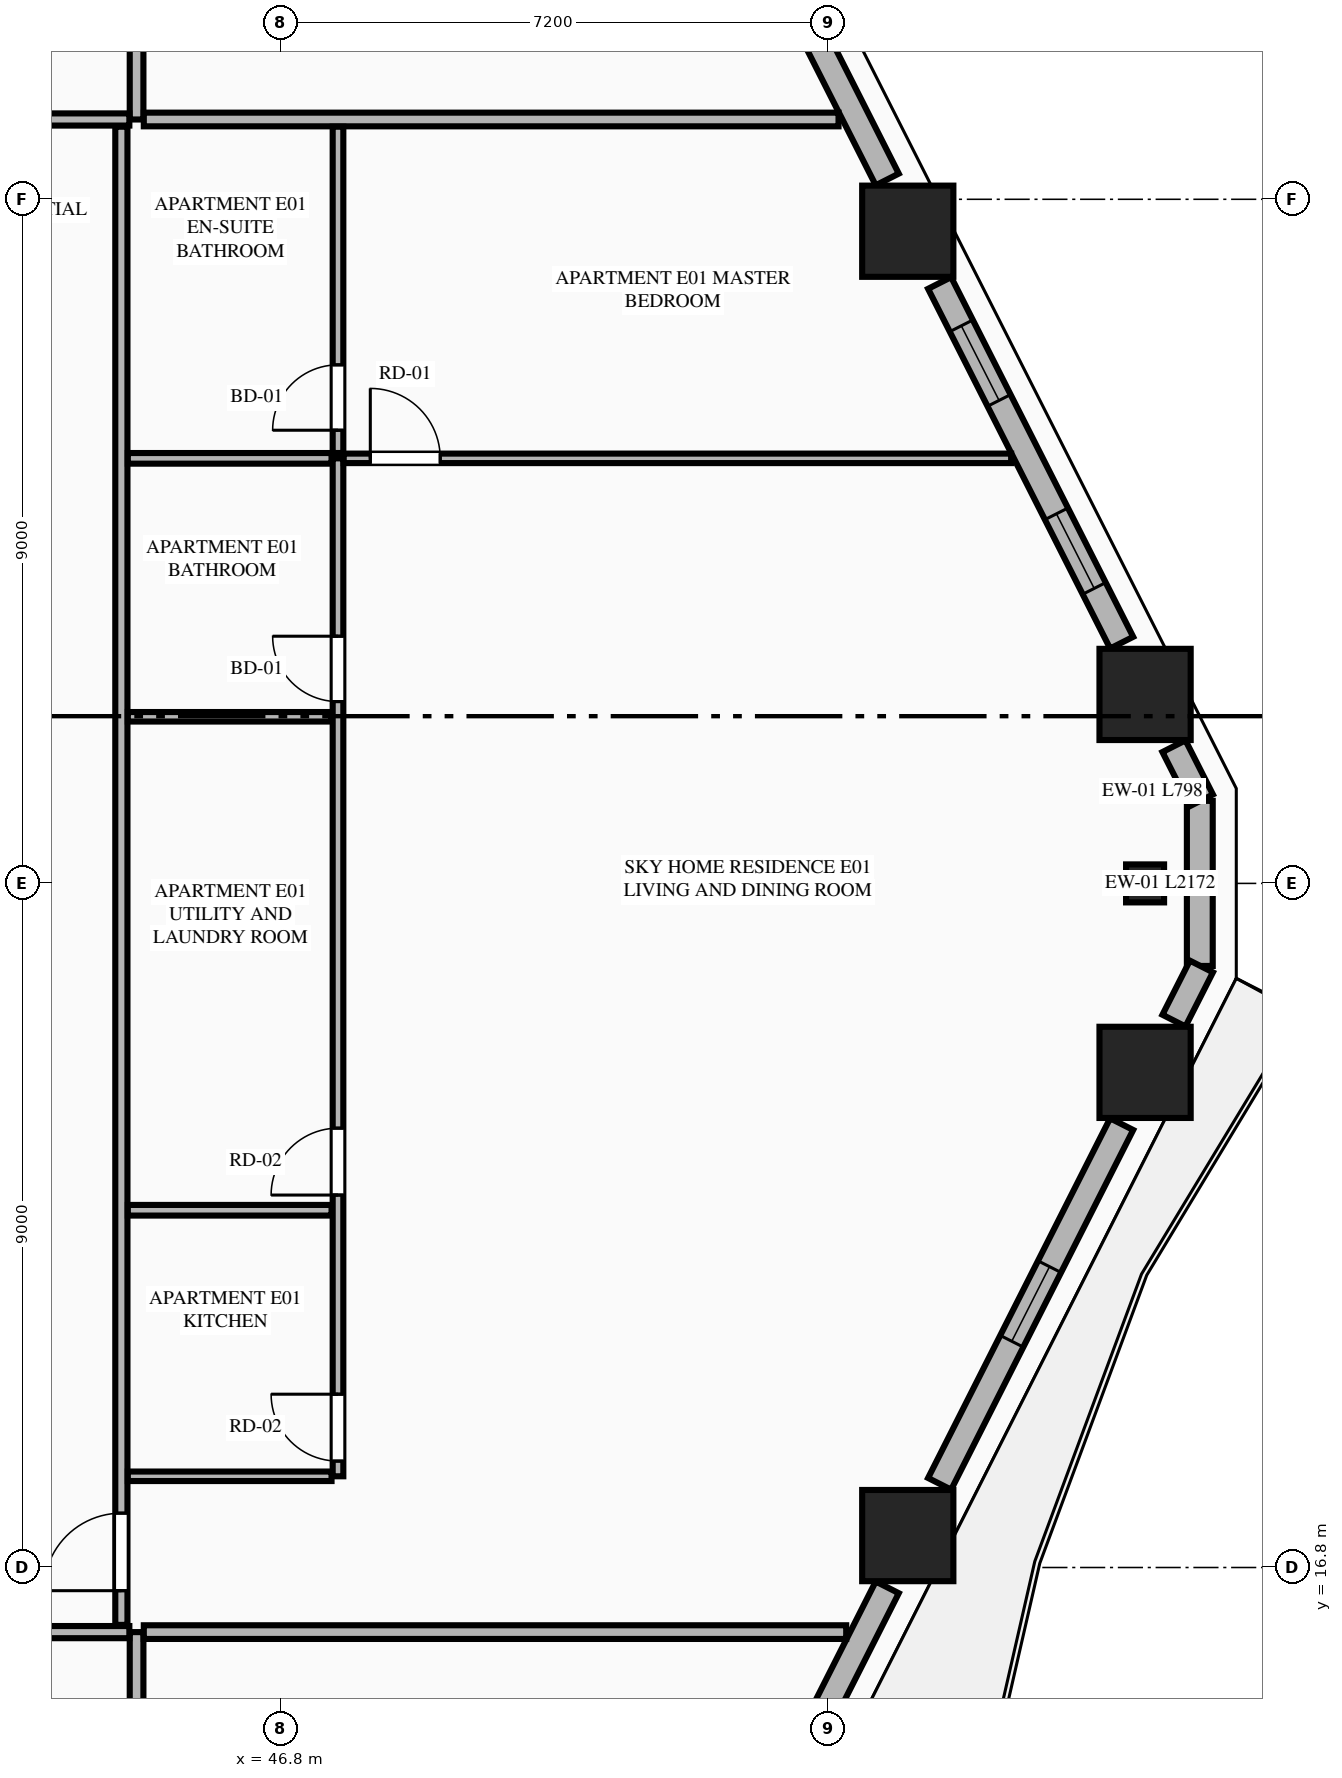
"""IFC4 building model, lengths in metres.
Left out: names, types, materials, properties, quantities, classifications, styles, units other than length and angle.
Written with IfcOpenShell. Run it as: python <this file> out.ifc"""

import sys

from ifc_helpers import new_model, si_unit, direction, frame, frame_2d, origin, origin_2d, place, context, subcontext, project, spatial, rectangle, extrude, element, fill, save


model = new_model("IFC4")
c1 = context("Model", 3, precision=1e-05, world=origin(), true_north=direction((0.0, 1.0)))
c2 = subcontext(c1, "Body", "Model", "MODEL_VIEW")
j1 = project(units=[si_unit("LENGTHUNIT", "METRE"), si_unit("PLANEANGLEUNIT", "RADIAN")], contexts=[c1])
p1 = place(None, origin())
s1 = spatial("IfcSite", under=j1, at=p1, CompositionType="ELEMENT")
p2 = place(p1, origin())
s2 = spatial("IfcBuilding", under=s1, at=p2, CompositionType="ELEMENT")
p3 = place(p2, frame((0.0, 0.0, 49.75)))
s3 = spatial("IfcBuildingStorey", under=s2, at=p3, CompositionType="ELEMENT", Elevation=49.75)
for number, where, z_axis, x_axis in (
    (1, (55.046, 17.22, 0.0), (0.0, 0.0, 1.0), (1.0, 0.0, 0.0)),
    (2, (58.168, 23.314, 0.0), (0.0, 0.0, 1.0), (1.0, 0.0, 0.0)),
    (3, (58.168, 28.286, 0.0), (0.0, 0.0, 1.0), (1.0, 0.0, 0.0)),
    (4, (55.046, 34.38, 0.0), (0.0, 0.0, 1.0), (1.0, 0.0, 0.0)),
):
    element("IfcColumn", number, at=place(p3, frame(where, z_axis=z_axis, x_axis=x_axis)), inside=s3, PredefinedType="COLUMN", context=c2, shape_type="SweptSolid", body=[
        extrude(rectangle(XDim=1.2, YDim=1.2, at=origin_2d()), origin(), (0.0, 0.0, 1.0), 3.55),
    ])
p4 = place(p3, frame((58.168, 25.8, 0.0), z_axis=(0.0, 0.0, 1.0), x_axis=(0.0, 1.0, 0.0)))
e5 = element("IfcColumn", 5, at=p4, inside=s3, PredefinedType="PILASTER", context=c2, shape_type="SweptSolid", body=[
    extrude(rectangle(XDim=0.5, YDim=0.35, at=origin_2d()), origin(), (0.0, 0.0, 1.0), 3.55),
])
p5 = place(p3, frame((58.888, 24.714, 0.0), z_axis=(0.0, 0.0, 1.0), x_axis=(0.0, 1.0, 0.0)))
e6 = element("IfcWall", 6, at=p5, inside=s3, PredefinedType="STANDARD", context=c2, shape_type="SweptSolid", body=[
    extrude(rectangle(XDim=2.172, YDim=0.34, at=frame_2d((1.086, 0.0))), origin(), (0.0, 0.0, 1.0), 3.33),
])
p6 = place(p3, frame((52.271, 11.59, 0.0), z_axis=(0.0, 0.0, 1.0), x_axis=(0.451592100298, 0.892224509273, 0.0)))
e7 = element("IfcWall", 7, at=p6, inside=s3, PredefinedType="STANDARD", context=c2, shape_type="SweptSolid", body=[
    extrude(rectangle(XDim=5.547, YDim=0.34, at=frame_2d((2.773, 0.0))), origin(), (0.0, 0.0, 1.0), 2.787),
])
p7 = place(p6, frame((1.768, 0.0, 0.0)))
e8 = element("IfcOpeningElement", 8, at=p7, cuts=e7, PredefinedType="OPENING", context=c2, shape_type="SweptSolid", body=[
    extrude(rectangle(XDim=1.1, YDim=2.25, at=frame_2d((0.55, 1.125))), frame((0.0, 0.18, 0.0), z_axis=(0.0, -1.0, 0.0), x_axis=(1.0, 0.0, 0.0)), (0.0, 0.0, 1.0), 0.36),
])
p8 = place(p3, frame((55.465, 17.901, 0.0), z_axis=(0.0, 0.0, 1.0), x_axis=(0.451572088722, 0.892234637686, 0.0)))
e9 = element("IfcWall", 9, at=p8, inside=s3, PredefinedType="STANDARD", context=c2, shape_type="SweptSolid", body=[
    extrude(rectangle(XDim=5.304, YDim=0.34, at=frame_2d((2.652, 0.0))), origin(), (0.0, 0.0, 1.0), 2.787),
])
p9 = place(p8, frame((2.102, 0.0, 0.75)))
e10 = element("IfcOpeningElement", 10, at=p9, cuts=e9, PredefinedType="OPENING", context=c2, shape_type="SweptSolid", body=[
    extrude(rectangle(XDim=1.1, YDim=1.887, at=frame_2d((0.55, 0.943))), frame((0.0, 0.18, 0.0), z_axis=(0.0, -1.0, 0.0), x_axis=(1.0, 0.0, 0.0)), (0.0, 0.0, 1.0), 0.36),
])
for number, where, z_axis, x_axis in (
    (11, (58.548, 23.995, 0.0), (0.0, 0.0, 1.0), (0.452, 0.892, 0.0)),
    (12, (58.909, 26.893, 0.0), (0.0, 0.0, 1.0), (-0.452, 0.892, 0.0)),
):
    element("IfcWall", number, at=place(p3, frame(where, z_axis=z_axis, x_axis=x_axis)), inside=s3, PredefinedType="STANDARD", context=c2, shape_type="SweptSolid", body=[
        extrude(rectangle(XDim=0.798, YDim=0.34, at=frame_2d((0.399, 0.0))), origin(), (0.0, 0.0, 1.0), 3.33),
    ])
p10 = place(p3, frame((57.86, 28.967, 0.0), z_axis=(0.0, 0.0, 1.0), x_axis=(-0.451590635984, 0.892225250422, 0.0)))
e13 = element("IfcWall", 13, at=p10, inside=s3, PredefinedType="STANDARD", context=c2, shape_type="SweptSolid", body=[
    extrude(rectangle(XDim=5.303, YDim=0.34, at=frame_2d((2.652, 0.0))), origin(), (0.0, 0.0, 1.0), 2.787),
])
p11 = place(p10, frame((0.8, 0.0, 0.75)))
e14 = element("IfcOpeningElement", 14, at=p11, cuts=e13, PredefinedType="OPENING", context=c2, shape_type="SweptSolid", body=[
    extrude(rectangle(XDim=1.1, YDim=1.887, at=frame_2d((0.55, 0.943))), frame((0.0, 0.18, 0.0), z_axis=(0.0, -1.0, 0.0), x_axis=(1.0, 0.0, 0.0)), (0.0, 0.0, 1.0), 0.36),
])
p12 = place(p10, frame((3.572, 0.0, 0.75)))
e15 = element("IfcOpeningElement", 15, at=p12, cuts=e13, PredefinedType="OPENING", context=c2, shape_type="SweptSolid", body=[
    extrude(rectangle(XDim=1.1, YDim=1.887, at=frame_2d((0.55, 0.943))), frame((0.0, 0.18, 0.0), z_axis=(0.0, -1.0, 0.0), x_axis=(1.0, 0.0, 0.0)), (0.0, 0.0, 1.0), 0.36),
])
p13 = place(p3, frame((54.776, 35.061, 0.0), z_axis=(0.0, 0.0, 1.0), x_axis=(-0.451592100298, 0.892224509273, 0.0)))
e16 = element("IfcWall", 16, at=p13, inside=s3, PredefinedType="STANDARD", context=c2, shape_type="SweptSolid", body=[
    extrude(rectangle(XDim=5.547, YDim=0.34, at=frame_2d((2.773, 0.0))), origin(), (0.0, 0.0, 1.0), 2.787),
])
p14 = place(p13, frame((2.223, 0.0, 0.75)))
e17 = element("IfcOpeningElement", 17, at=p14, cuts=e16, PredefinedType="OPENING", context=c2, shape_type="SweptSolid", body=[
    extrude(rectangle(XDim=1.1, YDim=1.887, at=frame_2d((0.55, 0.943))), frame((0.0, 0.18, 0.0), z_axis=(0.0, -1.0, 0.0), x_axis=(1.0, 0.0, 0.0)), (0.0, 0.0, 1.0), 0.36),
])
p15 = place(p3, frame((44.9, 2.455, 0.0), z_axis=(0.0, 0.0, 1.0), x_axis=(0.0, 1.0, 0.0)))
e18 = element("IfcWall", 18, at=p15, inside=s3, PredefinedType="PARTITIONING", context=c2, shape_type="SweptSolid", body=[
    extrude(rectangle(XDim=13.495, YDim=0.18, at=frame_2d((6.748, 0.0))), origin(), (0.0, 0.0, 1.0), 3.33),
])
p16 = place(p3, frame((19.995, 15.95, 0.0), z_axis=(0.0, 0.0, 1.0), x_axis=(1.0, 0.0, 0.0)))
e19 = element("IfcWall", 19, at=p16, inside=s3, PredefinedType="PARTITIONING", context=c2, shape_type="SweptSolid", body=[
    extrude(rectangle(XDim=24.81, YDim=0.16, at=frame_2d((12.405, 0.0))), origin(), (0.0, 0.0, 1.0), 3.33),
])
p17 = place(p16, frame((22.605, 0.0, 0.0)))
e20 = element("IfcOpeningElement", 20, at=p17, cuts=e19, PredefinedType="OPENING", context=c2, shape_type="SweptSolid", body=[
    extrude(rectangle(XDim=1.02, YDim=2.25, at=frame_2d((0.51, 1.125))), frame((0.0, 0.09, 0.0), z_axis=(0.0, -1.0, 0.0), x_axis=(1.0, 0.0, 0.0)), (0.0, 0.0, 1.0), 0.18),
])
p18 = place(p3, frame((44.9, 35.85, 0.0), z_axis=(0.0, 0.0, 1.0), x_axis=(0.0, 1.0, 0.0)))
e21 = element("IfcWall", 21, at=p18, inside=s3, PredefinedType="PARTITIONING", context=c2, shape_type="SweptSolid", body=[
    extrude(rectangle(XDim=13.295, YDim=0.18, at=frame_2d((6.647, 0.0))), origin(), (0.0, 0.0, 1.0), 3.33),
])
p19 = place(p3, frame((28.373, 35.85, 0.0), z_axis=(0.0, 0.0, 1.0), x_axis=(1.0, 0.0, 0.0)))
e22 = element("IfcWall", 22, at=p19, inside=s3, PredefinedType="PARTITIONING", context=c2, shape_type="SweptSolid", body=[
    extrude(rectangle(XDim=16.432, YDim=0.16, at=frame_2d((8.216, 0.0))), origin(), (0.0, 0.0, 1.0), 3.33),
])
p20 = place(p19, frame((0.355, 0.0, 0.0)))
e23 = element("IfcOpeningElement", 23, at=p20, cuts=e22, PredefinedType="OPENING", context=c2, shape_type="SweptSolid", body=[
    extrude(rectangle(XDim=1.35, YDim=2.35, at=frame_2d((0.675, 1.175))), frame((0.0, 0.09, 0.0), z_axis=(0.0, -1.0, 0.0), x_axis=(1.0, 0.0, 0.0)), (0.0, 0.0, 1.0), 0.18),
])
p21 = place(p3, frame((44.995, 15.95, 0.0), z_axis=(0.0, 0.0, 1.0), x_axis=(1.0, 0.0, 0.0)))
e24 = element("IfcWall", 24, at=p21, inside=s3, PredefinedType="PARTITIONING", context=c2, shape_type="SweptSolid", body=[
    extrude(rectangle(XDim=9.241, YDim=0.18, at=frame_2d((4.621, 0.0))), origin(), (0.0, 0.0, 1.0), 3.33),
])
p22 = place(p3, frame((44.995, 35.85, 0.0), z_axis=(0.0, 0.0, 1.0), x_axis=(1.0, 0.0, 0.0)))
e25 = element("IfcWall", 25, at=p22, inside=s3, PredefinedType="PARTITIONING", context=c2, shape_type="SweptSolid", body=[
    extrude(rectangle(XDim=9.14, YDim=0.18, at=frame_2d((4.57, 0.0))), origin(), (0.0, 0.0, 1.0), 3.33),
])
p23 = place(p3, frame((44.7, 16.045, 0.0), z_axis=(0.0, 0.0, 1.0), x_axis=(0.0, 1.0, 0.0)))
e26 = element("IfcWall", 26, at=p23, inside=s3, PredefinedType="PARTITIONING", context=c2, shape_type="SweptSolid", body=[
    extrude(rectangle(XDim=19.71, YDim=0.16, at=frame_2d((9.855, 0.0))), origin(), (0.0, 0.0, 1.0), 2.7),
])
p24 = place(p23, frame((0.45, 0.0, 0.0)))
e27 = element("IfcOpeningElement", 27, at=p24, cuts=e26, PredefinedType="OPENING", context=c2, shape_type="SweptSolid", body=[
    extrude(rectangle(XDim=1.02, YDim=2.25, at=frame_2d((0.51, 1.125))), frame((0.0, 0.09, 0.0), z_axis=(0.0, -1.0, 0.0), x_axis=(1.0, 0.0, 0.0)), (0.0, 0.0, 1.0), 0.18),
])
p25 = place(p3, frame((44.785, 18.0, 0.0), z_axis=(0.0, 0.0, 1.0), x_axis=(1.0, 0.0, 0.0)))
e28 = element("IfcWall", 28, at=p25, inside=s3, PredefinedType="PARTITIONING", context=c2, shape_type="SweptSolid", body=[
    extrude(rectangle(XDim=2.68, YDim=0.125, at=frame_2d((1.34, 0.0))), origin(), (0.0, 0.0, 1.0), 2.7),
])
p26 = place(p3, frame((47.55, 18.0, 0.0), z_axis=(0.0, 0.0, 1.0), x_axis=(0.0, 1.0, 0.0)))
e29 = element("IfcWall", 29, at=p26, inside=s3, PredefinedType="PLUMBINGWALL", context=c2, shape_type="SweptSolid", body=[
    extrude(rectangle(XDim=13.392, YDim=0.14, at=frame_2d((6.696, 0.0))), origin(), (0.0, 0.0, 1.0), 3.33),
])
p27 = place(p26, frame((0.2, 0.0, 0.0)))
e30 = element("IfcOpeningElement", 30, at=p27, cuts=e29, PredefinedType="OPENING", context=c2, shape_type="SweptSolid", body=[
    extrude(rectangle(XDim=0.88, YDim=2.15, at=frame_2d((0.44, 1.075))), frame((0.0, 0.08, 0.0), z_axis=(0.0, -1.0, 0.0), x_axis=(1.0, 0.0, 0.0)), (0.0, 0.0, 1.0), 0.16),
])
p28 = place(p26, frame((3.7, 0.0, 0.0)))
e31 = element("IfcOpeningElement", 31, at=p28, cuts=e29, PredefinedType="OPENING", context=c2, shape_type="SweptSolid", body=[
    extrude(rectangle(XDim=0.88, YDim=2.15, at=frame_2d((0.44, 1.075))), frame((0.0, 0.08, 0.0), z_axis=(0.0, -1.0, 0.0), x_axis=(1.0, 0.0, 0.0)), (0.0, 0.0, 1.0), 0.16),
])
p29 = place(p26, frame((10.192, 0.0, 0.0)))
e32 = element("IfcOpeningElement", 32, at=p29, cuts=e29, PredefinedType="OPENING", context=c2, shape_type="SweptSolid", body=[
    extrude(rectangle(XDim=0.86, YDim=2.1, at=frame_2d((0.43, 1.05))), frame((0.0, 0.08, 0.0), z_axis=(0.0, -1.0, 0.0), x_axis=(1.0, 0.0, 0.0)), (0.0, 0.0, 1.0), 0.16),
])
p30 = place(p3, frame((47.55, 31.462, 0.0), z_axis=(0.0, 0.0, 1.0), x_axis=(0.0, 1.0, 0.0)))
e33 = element("IfcWall", 33, at=p30, inside=s3, PredefinedType="PLUMBINGWALL", context=c2, shape_type="SweptSolid", body=[
    extrude(rectangle(XDim=4.293, YDim=0.14, at=frame_2d((2.146, 0.0))), origin(), (0.0, 0.0, 1.0), 3.33),
])
p31 = place(p30, frame((0.3, 0.0, 0.0)))
e34 = element("IfcOpeningElement", 34, at=p31, cuts=e33, PredefinedType="OPENING", context=c2, shape_type="SweptSolid", body=[
    extrude(rectangle(XDim=0.86, YDim=2.1, at=frame_2d((0.43, 1.05))), frame((0.0, 0.08, 0.0), z_axis=(0.0, -1.0, 0.0), x_axis=(1.0, 0.0, 0.0)), (0.0, 0.0, 1.0), 0.16),
])
p32 = place(p3, frame((44.785, 31.392, 0.0), z_axis=(0.0, 0.0, 1.0), x_axis=(1.0, 0.0, 0.0)))
e35 = element("IfcWall", 35, at=p32, inside=s3, PredefinedType="PLUMBINGWALL", context=c2, shape_type="SweptSolid", body=[
    extrude(rectangle(XDim=2.68, YDim=0.14, at=frame_2d((1.34, 0.0))), origin(), (0.0, 0.0, 1.0), 3.33),
])
p33 = place(p3, frame((47.625, 31.392, 0.0), z_axis=(0.0, 0.0, 1.0), x_axis=(1.0, 0.0, 0.0)))
e36 = element("IfcWall", 36, at=p33, inside=s3, PredefinedType="PARTITIONING", context=c2, shape_type="SweptSolid", body=[
    extrude(rectangle(XDim=8.781, YDim=0.125, at=frame_2d((4.391, 0.0))), origin(), (0.0, 0.0, 1.0), 3.33),
])
p34 = place(p33, frame((0.35, 0.0, 0.0)))
e37 = element("IfcOpeningElement", 37, at=p34, cuts=e36, PredefinedType="OPENING", context=c2, shape_type="SweptSolid", body=[
    extrude(rectangle(XDim=0.92, YDim=2.15, at=frame_2d((0.46, 1.075))), frame((0.0, 0.073, 0.0), z_axis=(0.0, -1.0, 0.0), x_axis=(1.0, 0.0, 0.0)), (0.0, 0.0, 1.0), 0.145),
])
p35 = place(p3, frame((44.785, 21.5, 0.0), z_axis=(0.0, 0.0, 1.0), x_axis=(1.0, 0.0, 0.0)))
e38 = element("IfcWall", 38, at=p35, inside=s3, PredefinedType="PLUMBINGWALL", context=c2, shape_type="SweptSolid", body=[
    extrude(rectangle(XDim=2.68, YDim=0.14, at=frame_2d((1.34, 0.0))), origin(), (0.0, 0.0, 1.0), 3.33),
])
p36 = place(p3, frame((44.785, 27.992, 0.0), z_axis=(0.0, 0.0, 1.0), x_axis=(1.0, 0.0, 0.0)))
e39 = element("IfcWall", 39, at=p36, inside=s3, PredefinedType="PARTITIONING", context=c2, shape_type="SweptSolid", body=[
    extrude(rectangle(XDim=2.68, YDim=0.125, at=frame_2d((1.34, 0.0))), origin(), (0.0, 0.0, 1.0), 3.33),
])
p37 = place(p9, origin())
e40 = element("IfcWindow", 40, at=p37, inside=s3, PartitioningType="SINGLE_PANEL", PredefinedType="WINDOW", context=c2, shape_type="SweptSolid", body=[
    extrude(rectangle(XDim=1.1, YDim=1.887, at=frame_2d((0.55, 0.943))), frame((0.0, 0.03, 0.0), z_axis=(0.0, -1.0, 0.0), x_axis=(1.0, 0.0, 0.0)), (0.0, 0.0, 1.0), 0.06),
])
fill(e10, e40)
p38 = place(p11, origin())
e41 = element("IfcWindow", 41, at=p38, inside=s3, PartitioningType="SINGLE_PANEL", PredefinedType="WINDOW", context=c2, shape_type="SweptSolid", body=[
    extrude(rectangle(XDim=1.1, YDim=1.887, at=frame_2d((0.55, 0.943))), frame((0.0, 0.03, 0.0), z_axis=(0.0, -1.0, 0.0), x_axis=(1.0, 0.0, 0.0)), (0.0, 0.0, 1.0), 0.06),
])
fill(e14, e41)
p39 = place(p27, origin())
e42 = element("IfcDoor", 42, at=p39, inside=s3, OperationType="SINGLE_SWING_RIGHT", PredefinedType="DOOR", context=c2, shape_type="SweptSolid", body=[
    extrude(rectangle(XDim=0.88, YDim=2.15, at=frame_2d((0.44, 1.075))), frame((0.0, 0.025, 0.0), z_axis=(0.0, -1.0, 0.0), x_axis=(1.0, 0.0, 0.0)), (0.0, 0.0, 1.0), 0.05),
])
fill(e30, e42)
p40 = place(p28, origin())
e43 = element("IfcDoor", 43, at=p40, inside=s3, OperationType="SINGLE_SWING_LEFT", PredefinedType="DOOR", context=c2, shape_type="SweptSolid", body=[
    extrude(rectangle(XDim=0.88, YDim=2.15, at=frame_2d((0.44, 1.075))), frame((0.0, 0.025, 0.0), z_axis=(0.0, -1.0, 0.0), x_axis=(1.0, 0.0, 0.0)), (0.0, 0.0, 1.0), 0.05),
])
fill(e31, e43)
p41 = place(p29, origin())
e44 = element("IfcDoor", 44, at=p41, inside=s3, OperationType="SINGLE_SWING_RIGHT", PredefinedType="DOOR", context=c2, shape_type="SweptSolid", body=[
    extrude(rectangle(XDim=0.86, YDim=2.1, at=frame_2d((0.43, 1.05))), frame((0.0, 0.025, 0.0), z_axis=(0.0, -1.0, 0.0), x_axis=(1.0, 0.0, 0.0)), (0.0, 0.0, 1.0), 0.05),
])
fill(e32, e44)
p42 = place(p31, origin())
e45 = element("IfcDoor", 45, at=p42, inside=s3, OperationType="SINGLE_SWING_LEFT", PredefinedType="DOOR", context=c2, shape_type="SweptSolid", body=[
    extrude(rectangle(XDim=0.86, YDim=2.1, at=frame_2d((0.43, 1.05))), frame((0.0, 0.025, 0.0), z_axis=(0.0, -1.0, 0.0), x_axis=(1.0, 0.0, 0.0)), (0.0, 0.0, 1.0), 0.05),
])
fill(e34, e45)
p43 = place(p24, origin())
e46 = element("IfcDoor", 46, at=p43, inside=s3, OperationType="SINGLE_SWING_LEFT", PredefinedType="DOOR", context=c2, shape_type="SweptSolid", body=[
    extrude(rectangle(XDim=1.02, YDim=2.25, at=frame_2d((0.51, 1.125))), frame((0.0, 0.025, 0.0), z_axis=(0.0, -1.0, 0.0), x_axis=(1.0, 0.0, 0.0)), (0.0, 0.0, 1.0), 0.05),
])
fill(e27, e46)
p44 = place(p34, origin())
e47 = element("IfcDoor", 47, at=p44, inside=s3, OperationType="SINGLE_SWING_LEFT", PredefinedType="DOOR", context=c2, shape_type="SweptSolid", body=[
    extrude(rectangle(XDim=0.92, YDim=2.15, at=frame_2d((0.46, 1.075))), frame((0.0, 0.025, 0.0), z_axis=(0.0, -1.0, 0.0), x_axis=(1.0, 0.0, 0.0)), (0.0, 0.0, 1.0), 0.05),
])
fill(e37, e47)
p45 = place(p12, origin())
e48 = element("IfcWindow", 48, at=p45, inside=s3, PartitioningType="SINGLE_PANEL", PredefinedType="WINDOW", context=c2, shape_type="SweptSolid", body=[
    extrude(rectangle(XDim=1.1, YDim=1.887, at=frame_2d((0.55, 0.943))), frame((0.0, 0.03, 0.0), z_axis=(0.0, -1.0, 0.0), x_axis=(1.0, 0.0, 0.0)), (0.0, 0.0, 1.0), 0.06),
])
fill(e15, e48)
save(model, sys.argv[1])
